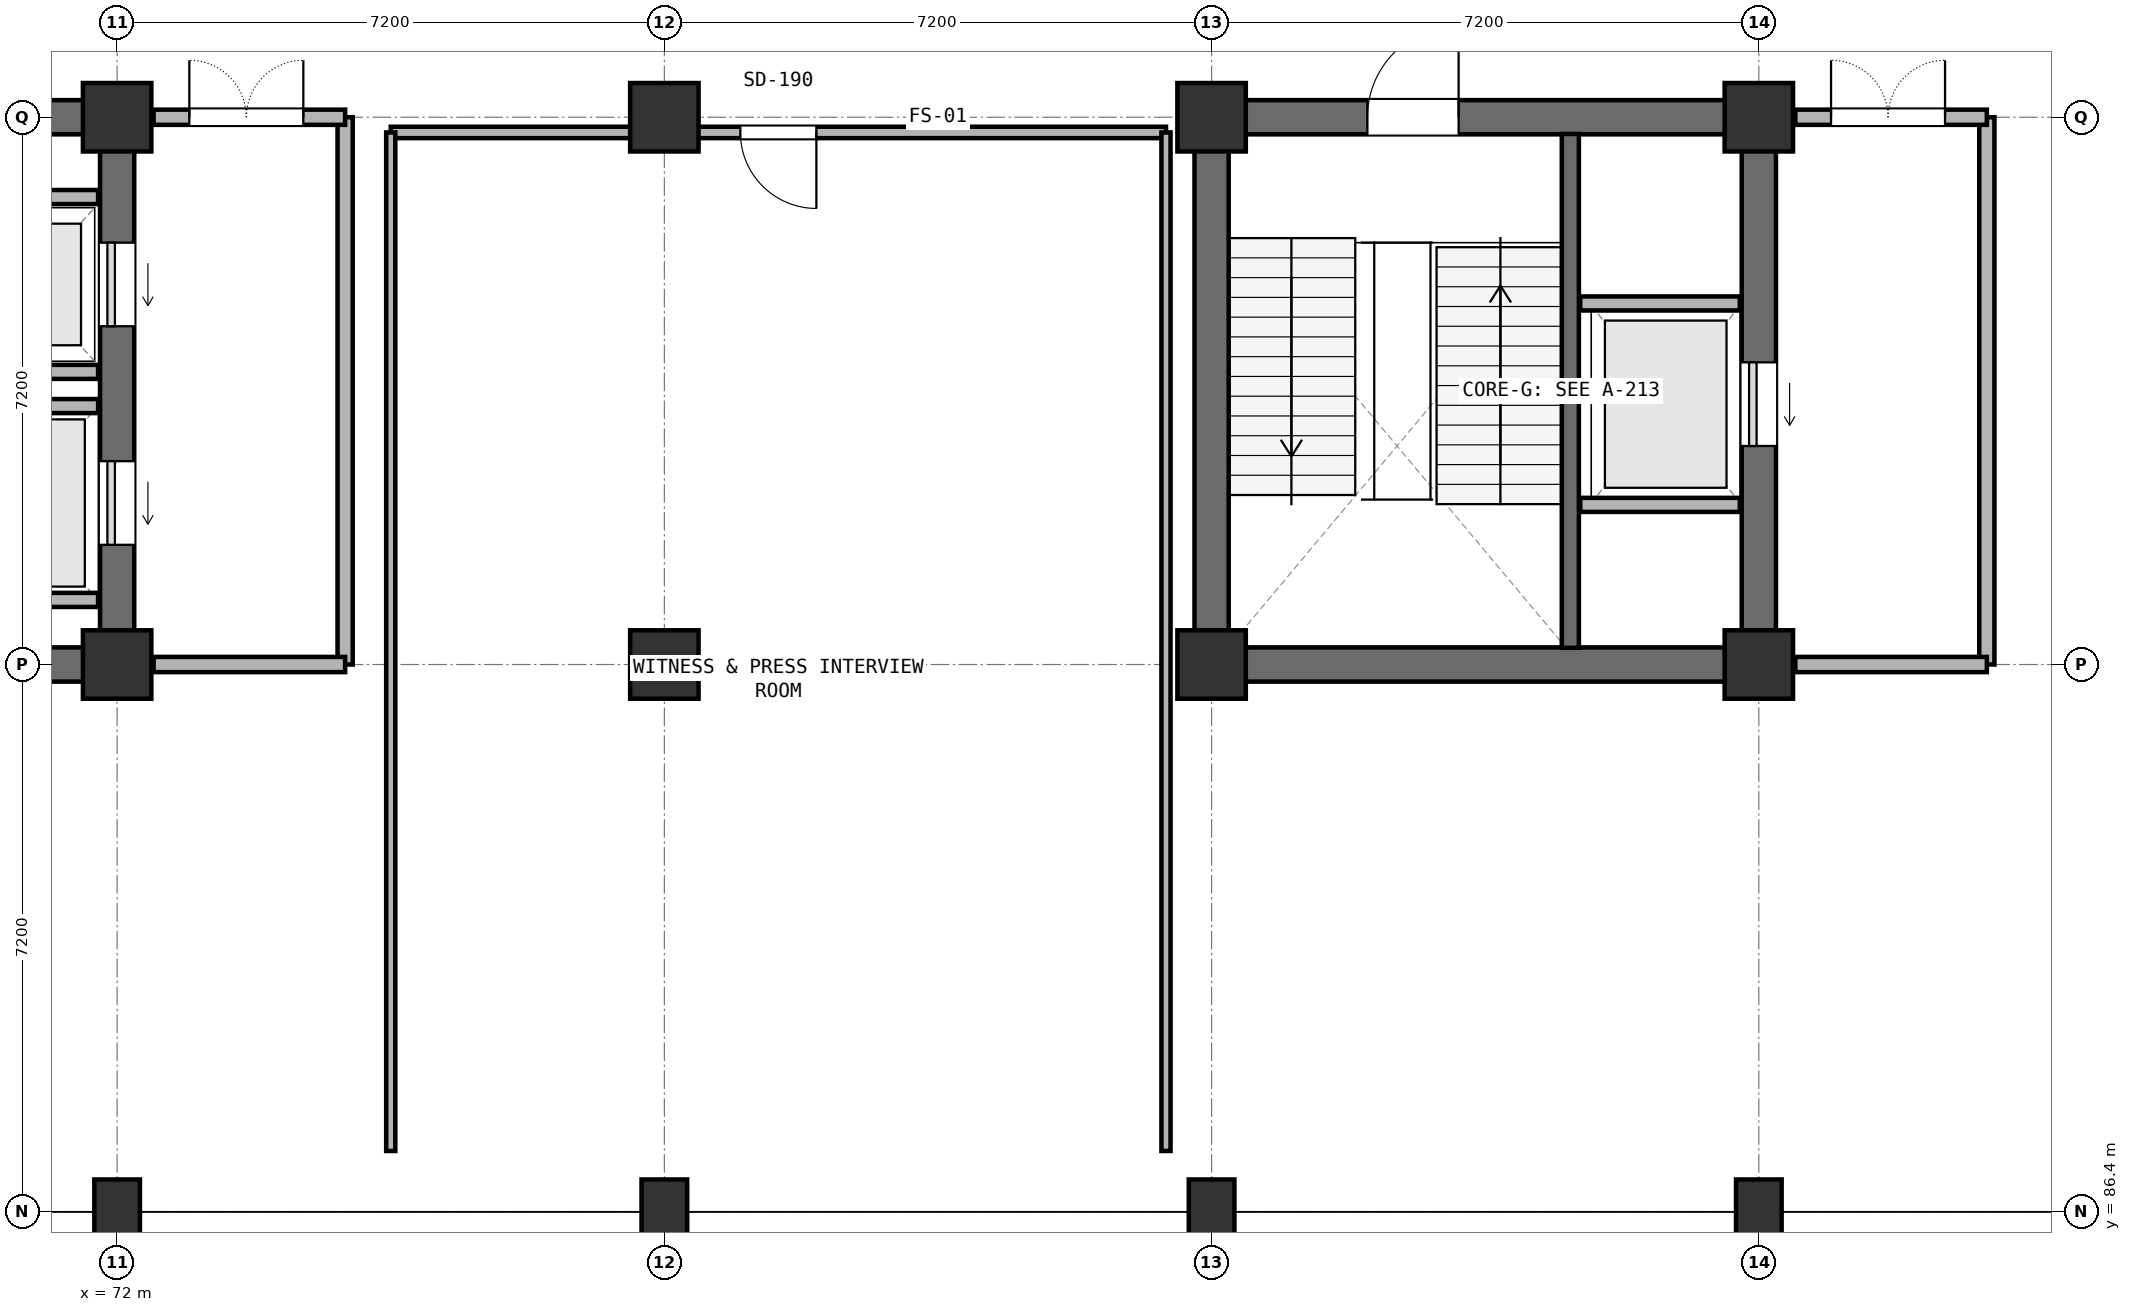
"""IFC4 building model, lengths in metres.
Left out: names, types, materials, properties, quantities, classifications, styles, units other than length and angle.
Written with IfcOpenShell. Run it as: python <this file> out.ifc"""

import sys

from ifc_helpers import new_model, si_unit, direction, frame, frame_2d, origin, origin_2d, place, context, subcontext, project, spatial, rectangle, extrude, element, fill, save


model = new_model("IFC4")
c1 = context("Model", 3, precision=1e-05, world=origin(), true_north=direction((0.0, 1.0)))
c2 = subcontext(c1, "Body", "Model", "MODEL_VIEW")
j1 = project(units=[si_unit("LENGTHUNIT", "METRE"), si_unit("PLANEANGLEUNIT", "RADIAN")], contexts=[c1])
p1 = place(None, origin())
s1 = spatial("IfcSite", under=j1, at=p1, CompositionType="ELEMENT")
p2 = place(p1, origin())
s2 = spatial("IfcBuilding", under=s1, at=p2, CompositionType="ELEMENT")
p3 = place(p2, frame((0.0, 0.0, 5.4)))
s3 = spatial("IfcBuildingStorey", under=s2, at=p3, CompositionType="ELEMENT", Elevation=5.4)
p4 = place(p3, frame((72.0, 86.4, 0.0), z_axis=(0.0, 0.0, 1.0), x_axis=(1.0, 0.0, 0.0)))
e1 = element("IfcColumn", 1, at=p4, inside=s3, PredefinedType="COLUMN", context=c2, shape_type="SweptSolid", body=[
    extrude(rectangle(XDim=0.6, YDim=0.85, at=origin_2d()), origin(), (0.0, 0.0, 1.0), 4.8),
])
for number, where, z_axis, x_axis in (
    (2, (72.0, 93.6, 0.0), (0.0, 0.0, 1.0), (1.0, 0.0, 0.0)),
    (3, (72.0, 100.8, 0.0), (0.0, 0.0, 1.0), (1.0, 0.0, 0.0)),
):
    element("IfcColumn", number, at=place(p3, frame(where, z_axis=z_axis, x_axis=x_axis)), inside=s3, PredefinedType="COLUMN", context=c2, shape_type="SweptSolid", body=[
        extrude(rectangle(XDim=0.9, YDim=0.9, at=origin_2d()), origin(), (0.0, 0.0, 1.0), 4.8),
    ])
p5 = place(p3, frame((79.2, 86.4, 0.0), z_axis=(0.0, 0.0, 1.0), x_axis=(1.0, 0.0, 0.0)))
e4 = element("IfcColumn", 4, at=p5, inside=s3, PredefinedType="COLUMN", context=c2, shape_type="SweptSolid", body=[
    extrude(rectangle(XDim=0.6, YDim=0.85, at=origin_2d()), origin(), (0.0, 0.0, 1.0), 4.8),
])
for number, where, z_axis, x_axis in (
    (5, (79.2, 93.6, 0.0), (0.0, 0.0, 1.0), (1.0, 0.0, 0.0)),
    (6, (79.2, 100.8, 0.0), (0.0, 0.0, 1.0), (1.0, 0.0, 0.0)),
):
    element("IfcColumn", number, at=place(p3, frame(where, z_axis=z_axis, x_axis=x_axis)), inside=s3, PredefinedType="COLUMN", context=c2, shape_type="SweptSolid", body=[
        extrude(rectangle(XDim=0.9, YDim=0.9, at=origin_2d()), origin(), (0.0, 0.0, 1.0), 4.8),
    ])
p6 = place(p3, frame((86.4, 86.4, 0.0), z_axis=(0.0, 0.0, 1.0), x_axis=(1.0, 0.0, 0.0)))
e7 = element("IfcColumn", 7, at=p6, inside=s3, PredefinedType="COLUMN", context=c2, shape_type="SweptSolid", body=[
    extrude(rectangle(XDim=0.6, YDim=0.85, at=origin_2d()), origin(), (0.0, 0.0, 1.0), 4.8),
])
for number, where, z_axis, x_axis in (
    (8, (86.4, 93.6, 0.0), (0.0, 0.0, 1.0), (1.0, 0.0, 0.0)),
    (9, (86.4, 100.8, 0.0), (0.0, 0.0, 1.0), (1.0, 0.0, 0.0)),
):
    element("IfcColumn", number, at=place(p3, frame(where, z_axis=z_axis, x_axis=x_axis)), inside=s3, PredefinedType="COLUMN", context=c2, shape_type="SweptSolid", body=[
        extrude(rectangle(XDim=0.9, YDim=0.9, at=origin_2d()), origin(), (0.0, 0.0, 1.0), 4.8),
    ])
p7 = place(p3, frame((93.6, 86.4, 0.0), z_axis=(0.0, 0.0, 1.0), x_axis=(1.0, 0.0, 0.0)))
e10 = element("IfcColumn", 10, at=p7, inside=s3, PredefinedType="COLUMN", context=c2, shape_type="SweptSolid", body=[
    extrude(rectangle(XDim=0.6, YDim=0.85, at=origin_2d()), origin(), (0.0, 0.0, 1.0), 4.8),
])
for number, where, z_axis, x_axis in (
    (11, (93.6, 93.6, 0.0), (0.0, 0.0, 1.0), (1.0, 0.0, 0.0)),
    (12, (93.6, 100.8, 0.0), (0.0, 0.0, 1.0), (1.0, 0.0, 0.0)),
):
    element("IfcColumn", number, at=place(p3, frame(where, z_axis=z_axis, x_axis=x_axis)), inside=s3, PredefinedType="COLUMN", context=c2, shape_type="SweptSolid", body=[
        extrude(rectangle(XDim=0.9, YDim=0.9, at=origin_2d()), origin(), (0.0, 0.0, 1.0), 4.8),
    ])
p8 = place(p3, frame((65.15, 93.6, 0.0), z_axis=(0.0, 0.0, 1.0), x_axis=(1.0, 0.0, 0.0)))
e13 = element("IfcWall", 13, at=p8, inside=s3, PredefinedType="SHEAR", context=c2, shape_type="SweptSolid", body=[
    extrude(rectangle(XDim=6.5, YDim=0.45, at=frame_2d((3.25, 0.0))), origin(), (0.0, 0.0, 1.0), 4.8),
])
p9 = place(p3, frame((72.0, 93.95, 0.0), z_axis=(0.0, 0.0, 1.0), x_axis=(0.0, 1.0, 0.0)))
e14 = element("IfcWall", 14, at=p9, inside=s3, PredefinedType="SHEAR", context=c2, shape_type="SweptSolid", body=[
    extrude(rectangle(XDim=6.5, YDim=0.45, at=frame_2d((3.25, 0.0))), origin(), (0.0, 0.0, 1.0), 4.8),
])
p10 = place(p9, frame((1.225, 0.0, 0.0)))
e15 = element("IfcOpeningElement", 15, at=p10, cuts=e14, PredefinedType="OPENING", context=c2, shape_type="SweptSolid", body=[
    extrude(rectangle(XDim=1.1, YDim=2.2, at=frame_2d((0.55, 1.1))), frame((0.0, 0.235, 0.0), z_axis=(0.0, -1.0, 0.0), x_axis=(1.0, 0.0, 0.0)), (0.0, 0.0, 1.0), 0.47),
])
p11 = place(p9, frame((4.1, 0.0, 0.0)))
e16 = element("IfcOpeningElement", 16, at=p11, cuts=e14, PredefinedType="OPENING", context=c2, shape_type="SweptSolid", body=[
    extrude(rectangle(XDim=1.1, YDim=2.2, at=frame_2d((0.55, 1.1))), frame((0.0, 0.235, 0.0), z_axis=(0.0, -1.0, 0.0), x_axis=(1.0, 0.0, 0.0)), (0.0, 0.0, 1.0), 0.47),
])
p12 = place(p3, frame((71.65, 100.8, 0.0), z_axis=(0.0, 0.0, 1.0), x_axis=(-1.0, 0.0, 0.0)))
e17 = element("IfcWall", 17, at=p12, inside=s3, PredefinedType="SHEAR", context=c2, shape_type="SweptSolid", body=[
    extrude(rectangle(XDim=6.5, YDim=0.45, at=frame_2d((3.25, 0.0))), origin(), (0.0, 0.0, 1.0), 4.8),
])
p13 = place(p12, frame((3.6, 0.0, 0.0)))
e18 = element("IfcOpeningElement", 18, at=p13, cuts=e17, PredefinedType="OPENING", context=c2, shape_type="SweptSolid", body=[
    extrude(rectangle(XDim=1.2, YDim=2.2, at=frame_2d((0.6, 1.1))), frame((0.0, 0.235, 0.0), z_axis=(0.0, -1.0, 0.0), x_axis=(1.0, 0.0, 0.0)), (0.0, 0.0, 1.0), 0.47),
])
p14 = place(p3, frame((86.75, 93.6, 0.0), z_axis=(0.0, 0.0, 1.0), x_axis=(1.0, 0.0, 0.0)))
e19 = element("IfcWall", 19, at=p14, inside=s3, PredefinedType="SHEAR", context=c2, shape_type="SweptSolid", body=[
    extrude(rectangle(XDim=6.5, YDim=0.45, at=frame_2d((3.25, 0.0))), origin(), (0.0, 0.0, 1.0), 4.8),
])
p15 = place(p3, frame((93.6, 93.95, 0.0), z_axis=(0.0, 0.0, 1.0), x_axis=(0.0, 1.0, 0.0)))
e20 = element("IfcWall", 20, at=p15, inside=s3, PredefinedType="SHEAR", context=c2, shape_type="SweptSolid", body=[
    extrude(rectangle(XDim=6.5, YDim=0.45, at=frame_2d((3.25, 0.0))), origin(), (0.0, 0.0, 1.0), 4.8),
])
p16 = place(p15, frame((2.525, 0.0, 0.0)))
e21 = element("IfcOpeningElement", 21, at=p16, cuts=e20, PredefinedType="OPENING", context=c2, shape_type="SweptSolid", body=[
    extrude(rectangle(XDim=1.1, YDim=2.2, at=frame_2d((0.55, 1.1))), frame((0.0, 0.235, 0.0), z_axis=(0.0, -1.0, 0.0), x_axis=(1.0, 0.0, 0.0)), (0.0, 0.0, 1.0), 0.47),
])
p17 = place(p3, frame((93.25, 100.8, 0.0), z_axis=(0.0, 0.0, 1.0), x_axis=(-1.0, 0.0, 0.0)))
e22 = element("IfcWall", 22, at=p17, inside=s3, PredefinedType="SHEAR", context=c2, shape_type="SweptSolid", body=[
    extrude(rectangle(XDim=6.5, YDim=0.45, at=frame_2d((3.25, 0.0))), origin(), (0.0, 0.0, 1.0), 4.8),
])
p18 = place(p17, frame((3.6, 0.0, 0.0)))
e23 = element("IfcOpeningElement", 23, at=p18, cuts=e22, PredefinedType="OPENING", context=c2, shape_type="SweptSolid", body=[
    extrude(rectangle(XDim=1.2, YDim=2.2, at=frame_2d((0.6, 1.1))), frame((0.0, 0.235, 0.0), z_axis=(0.0, -1.0, 0.0), x_axis=(1.0, 0.0, 0.0)), (0.0, 0.0, 1.0), 0.47),
])
p19 = place(p3, frame((86.4, 100.45, 0.0), z_axis=(0.0, 0.0, 1.0), x_axis=(0.0, -1.0, 0.0)))
e24 = element("IfcWall", 24, at=p19, inside=s3, PredefinedType="SHEAR", context=c2, shape_type="SweptSolid", body=[
    extrude(rectangle(XDim=6.5, YDim=0.45, at=frame_2d((3.25, 0.0))), origin(), (0.0, 0.0, 1.0), 4.8),
])
p20 = place(p3, frame((91.12, 93.82, 0.0), z_axis=(0.0, 0.0, 1.0), x_axis=(0.0, 1.0, 0.0)))
e25 = element("IfcWall", 25, at=p20, inside=s3, PredefinedType="SHEAR", context=c2, shape_type="SweptSolid", body=[
    extrude(rectangle(XDim=6.76, YDim=0.225, at=frame_2d((3.38, 0.0))), origin(), (0.0, 0.0, 1.0), 4.8),
])
for number, where, z_axis, x_axis in (
    (26, (69.65, 94.45, 0.0), (0.0, 0.0, 1.0), (1.0, 0.0, 0.0)),
    (27, (69.65, 97.0, 0.0), (0.0, 0.0, 1.0), (1.0, 0.0, 0.0)),
    (28, (69.65, 97.45, 0.0), (0.0, 0.0, 1.0), (1.0, 0.0, 0.0)),
    (29, (69.65, 99.75, 0.0), (0.0, 0.0, 1.0), (1.0, 0.0, 0.0)),
    (30, (91.25, 95.7, 0.0), (0.0, 0.0, 1.0), (1.0, 0.0, 0.0)),
    (31, (91.25, 98.35, 0.0), (0.0, 0.0, 1.0), (1.0, 0.0, 0.0)),
):
    element("IfcWall", number, at=place(p3, frame(where, z_axis=z_axis, x_axis=x_axis)), inside=s3, PredefinedType="PARTITIONING", context=c2, shape_type="SweptSolid", body=[
        extrude(rectangle(XDim=2.1, YDim=0.185, at=frame_2d((1.05, 0.0))), origin(), (0.0, 0.0, 1.0), 4.8),
    ])
p21 = place(p3, frame((75.0, 93.6, 0.0), z_axis=(0.0, 0.0, 1.0), x_axis=(0.0, 1.0, 0.0)))
e32 = element("IfcWall", 32, at=p21, inside=s3, PredefinedType="PARTITIONING", context=c2, shape_type="SweptSolid", body=[
    extrude(rectangle(XDim=7.2, YDim=0.2, at=frame_2d((3.6, 0.0))), origin(), (0.0, 0.0, 1.0), 3.52),
])
p22 = place(p3, frame((72.48, 93.6, 0.0), z_axis=(0.0, 0.0, 1.0), x_axis=(1.0, 0.0, 0.0)))
e33 = element("IfcWall", 33, at=p22, inside=s3, PredefinedType="PARTITIONING", context=c2, shape_type="SweptSolid", body=[
    extrude(rectangle(XDim=2.52, YDim=0.2, at=frame_2d((1.26, 0.0))), origin(), (0.0, 0.0, 1.0), 3.52),
])
p23 = place(p3, frame((75.0, 100.8, 0.0), z_axis=(0.0, 0.0, 1.0), x_axis=(-1.0, 0.0, 0.0)))
e34 = element("IfcWall", 34, at=p23, inside=s3, PredefinedType="PARTITIONING", context=c2, shape_type="SweptSolid", body=[
    extrude(rectangle(XDim=2.52, YDim=0.2, at=frame_2d((1.26, 0.0))), origin(), (0.0, 0.0, 1.0), 3.52),
])
p24 = place(p23, frame((0.55, 0.0, 0.0)))
e35 = element("IfcOpeningElement", 35, at=p24, cuts=e34, PredefinedType="OPENING", context=c2, shape_type="SweptSolid", body=[
    extrude(rectangle(XDim=1.5, YDim=2.2, at=frame_2d((0.75, 1.1))), frame((0.0, 0.11, 0.0), z_axis=(0.0, -1.0, 0.0), x_axis=(1.0, 0.0, 0.0)), (0.0, 0.0, 1.0), 0.22),
])
p25 = place(p3, frame((96.6, 93.6, 0.0), z_axis=(0.0, 0.0, 1.0), x_axis=(0.0, 1.0, 0.0)))
e36 = element("IfcWall", 36, at=p25, inside=s3, PredefinedType="PARTITIONING", context=c2, shape_type="SweptSolid", body=[
    extrude(rectangle(XDim=7.2, YDim=0.2, at=frame_2d((3.6, 0.0))), origin(), (0.0, 0.0, 1.0), 3.52),
])
p26 = place(p3, frame((94.08, 93.6, 0.0), z_axis=(0.0, 0.0, 1.0), x_axis=(1.0, 0.0, 0.0)))
e37 = element("IfcWall", 37, at=p26, inside=s3, PredefinedType="PARTITIONING", context=c2, shape_type="SweptSolid", body=[
    extrude(rectangle(XDim=2.52, YDim=0.2, at=frame_2d((1.26, 0.0))), origin(), (0.0, 0.0, 1.0), 3.52),
])
p27 = place(p3, frame((96.6, 100.8, 0.0), z_axis=(0.0, 0.0, 1.0), x_axis=(-1.0, 0.0, 0.0)))
e38 = element("IfcWall", 38, at=p27, inside=s3, PredefinedType="PARTITIONING", context=c2, shape_type="SweptSolid", body=[
    extrude(rectangle(XDim=2.52, YDim=0.2, at=frame_2d((1.26, 0.0))), origin(), (0.0, 0.0, 1.0), 3.52),
])
p28 = place(p27, frame((0.55, 0.0, 0.0)))
e39 = element("IfcOpeningElement", 39, at=p28, cuts=e38, PredefinedType="OPENING", context=c2, shape_type="SweptSolid", body=[
    extrude(rectangle(XDim=1.5, YDim=2.2, at=frame_2d((0.75, 1.1))), frame((0.0, 0.11, 0.0), z_axis=(0.0, -1.0, 0.0), x_axis=(1.0, 0.0, 0.0)), (0.0, 0.0, 1.0), 0.22),
])
p29 = place(p3, frame((85.8, 100.6, 0.0), z_axis=(0.0, 0.0, 1.0), x_axis=(-1.0, 0.0, 0.0)))
e40 = element("IfcWall", 40, at=p29, inside=s3, PredefinedType="PARTITIONING", context=c2, shape_type="SweptSolid", body=[
    extrude(rectangle(XDim=10.2, YDim=0.15, at=frame_2d((5.1, 0.0))), origin(), (0.0, 0.0, 1.0), 3.52),
])
p30 = place(p29, frame((4.6, 0.0, 0.0)))
e41 = element("IfcOpeningElement", 41, at=p30, cuts=e40, PredefinedType="OPENING", context=c2, shape_type="SweptSolid", body=[
    extrude(rectangle(XDim=1.0, YDim=2.15, at=frame_2d((0.5, 1.075))), frame((0.0, 0.085, 0.0), z_axis=(0.0, -1.0, 0.0), x_axis=(1.0, 0.0, 0.0)), (0.0, 0.0, 1.0), 0.17),
])
for number, where, z_axis, x_axis in (
    (42, (75.6, 87.2, 0.0), (0.0, 0.0, 1.0), (0.0, 1.0, 0.0)),
    (43, (85.8, 100.6, 0.0), (0.0, 0.0, 1.0), (0.0, -1.0, 0.0)),
):
    element("IfcWall", number, at=place(p3, frame(where, z_axis=z_axis, x_axis=x_axis)), inside=s3, PredefinedType="PARTITIONING", context=c2, shape_type="SweptSolid", body=[
        extrude(rectangle(XDim=13.4, YDim=0.12, at=frame_2d((6.7, 0.0))), origin(), (0.0, 0.0, 1.0), 3.52),
    ])
p31 = place(p10, origin())
e44 = element("IfcDoor", 44, at=p31, inside=s3, OperationType="SLIDING_TO_LEFT", PredefinedType="DOOR", context=c2, shape_type="SweptSolid", body=[
    extrude(rectangle(XDim=1.1, YDim=2.2, at=frame_2d((0.55, 1.1))), frame((0.0, 0.025, 0.0), z_axis=(0.0, -1.0, 0.0), x_axis=(1.0, 0.0, 0.0)), (0.0, 0.0, 1.0), 0.05),
])
fill(e15, e44)
p32 = place(p11, origin())
e45 = element("IfcDoor", 45, at=p32, inside=s3, OperationType="SLIDING_TO_LEFT", PredefinedType="DOOR", context=c2, shape_type="SweptSolid", body=[
    extrude(rectangle(XDim=1.1, YDim=2.2, at=frame_2d((0.55, 1.1))), frame((0.0, 0.025, 0.0), z_axis=(0.0, -1.0, 0.0), x_axis=(1.0, 0.0, 0.0)), (0.0, 0.0, 1.0), 0.05),
])
fill(e16, e45)
p33 = place(p16, origin())
e46 = element("IfcDoor", 46, at=p33, inside=s3, OperationType="SLIDING_TO_LEFT", PredefinedType="DOOR", context=c2, shape_type="SweptSolid", body=[
    extrude(rectangle(XDim=1.1, YDim=2.2, at=frame_2d((0.55, 1.1))), frame((0.0, 0.025, 0.0), z_axis=(0.0, -1.0, 0.0), x_axis=(1.0, 0.0, 0.0)), (0.0, 0.0, 1.0), 0.05),
])
fill(e21, e46)
p34 = place(p24, frame((1.5, 0.0, 0.0), z_axis=(0.0, 0.0, 1.0), x_axis=(-1.0, 0.0, 0.0)))
e47 = element("IfcDoor", 47, at=p34, inside=s3, OperationType="DOUBLE_DOOR_SINGLE_SWING", PredefinedType="DOOR", context=c2, shape_type="SweptSolid", body=[
    extrude(rectangle(XDim=1.5, YDim=2.2, at=frame_2d((0.75, 1.1))), frame((0.0, 0.025, 0.0), z_axis=(0.0, -1.0, 0.0), x_axis=(1.0, 0.0, 0.0)), (0.0, 0.0, 1.0), 0.05),
])
fill(e35, e47)
p35 = place(p18, frame((1.2, 0.0, 0.0), z_axis=(0.0, 0.0, 1.0), x_axis=(-1.0, 0.0, 0.0)))
e48 = element("IfcDoor", 48, at=p35, inside=s3, OperationType="SINGLE_SWING_RIGHT", PredefinedType="DOOR", context=c2, shape_type="SweptSolid", body=[
    extrude(rectangle(XDim=1.2, YDim=2.2, at=frame_2d((0.6, 1.1))), frame((0.0, 0.025, 0.0), z_axis=(0.0, -1.0, 0.0), x_axis=(1.0, 0.0, 0.0)), (0.0, 0.0, 1.0), 0.05),
])
fill(e23, e48)
p36 = place(p28, frame((1.5, 0.0, 0.0), z_axis=(0.0, 0.0, 1.0), x_axis=(-1.0, 0.0, 0.0)))
e49 = element("IfcDoor", 49, at=p36, inside=s3, OperationType="DOUBLE_DOOR_SINGLE_SWING", PredefinedType="DOOR", context=c2, shape_type="SweptSolid", body=[
    extrude(rectangle(XDim=1.5, YDim=2.2, at=frame_2d((0.75, 1.1))), frame((0.0, 0.025, 0.0), z_axis=(0.0, -1.0, 0.0), x_axis=(1.0, 0.0, 0.0)), (0.0, 0.0, 1.0), 0.05),
])
fill(e39, e49)
p37 = place(p30, origin())
e50 = element("IfcDoor", 50, at=p37, inside=s3, OperationType="SINGLE_SWING_LEFT", PredefinedType="DOOR", context=c2, shape_type="SweptSolid", body=[
    extrude(rectangle(XDim=1.0, YDim=2.15, at=frame_2d((0.5, 1.075))), frame((0.0, 0.025, 0.0), z_axis=(0.0, -1.0, 0.0), x_axis=(1.0, 0.0, 0.0)), (0.0, 0.0, 1.0), 0.05),
])
fill(e41, e50)
save(model, sys.argv[1])
